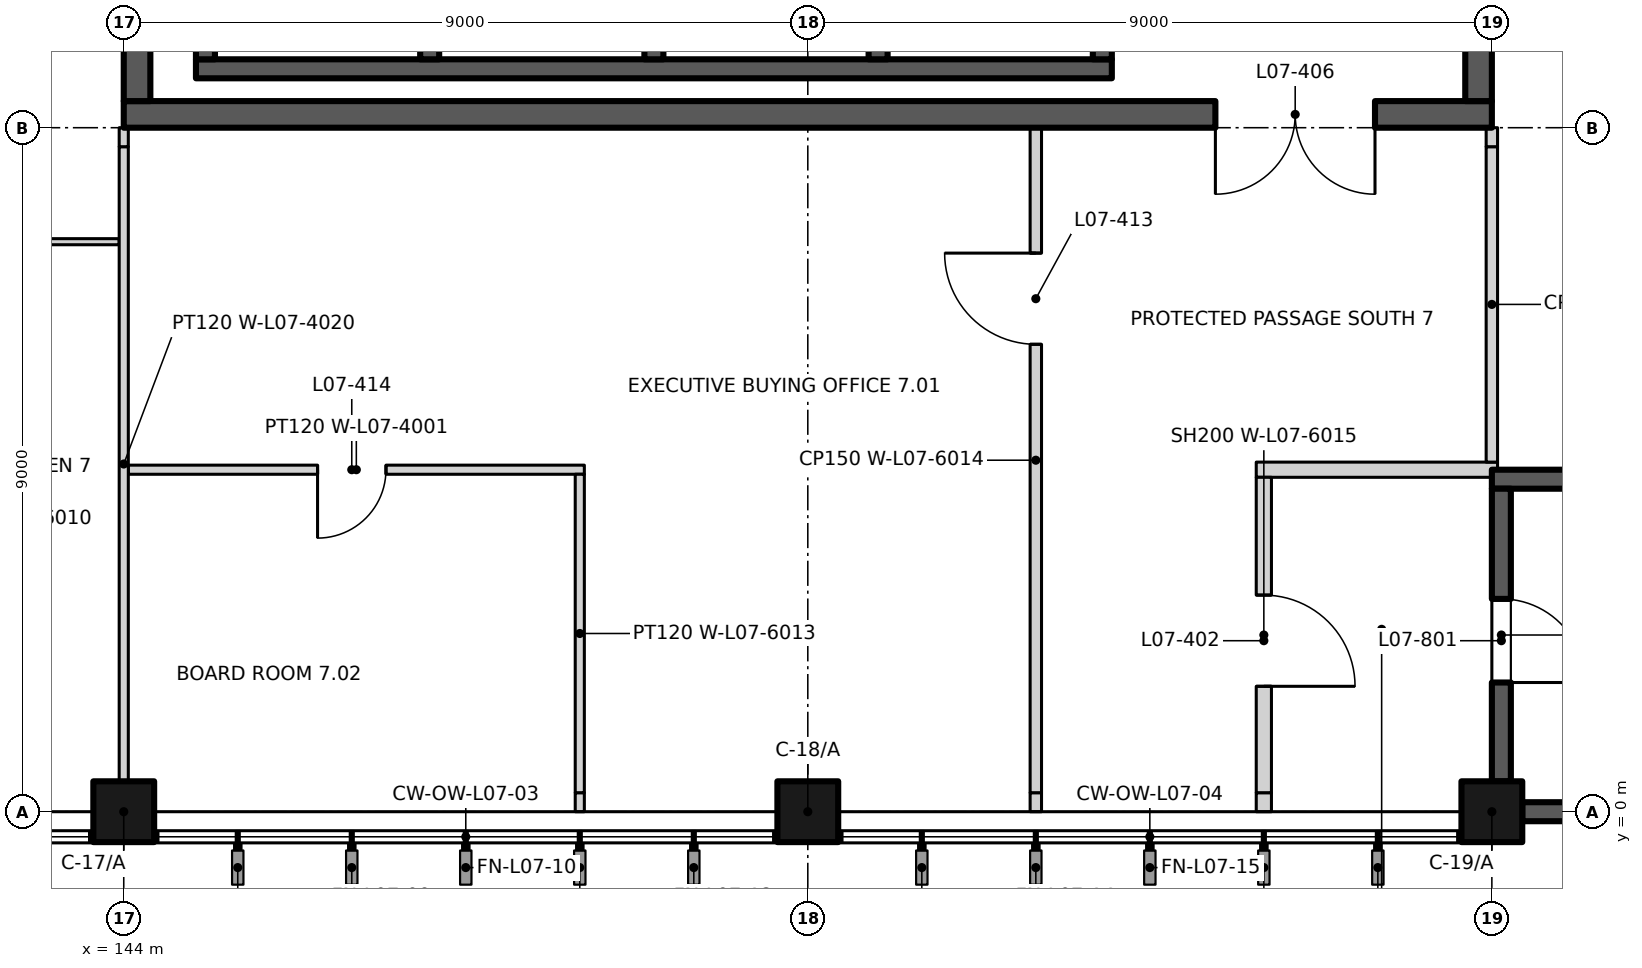
"""IFC4 building model, lengths in metres.
Left out: names, types, materials, properties, quantities, classifications, styles, units other than length and angle.
Written with IfcOpenShell. Run it as: python <this file> out.ifc"""

import sys

from ifc_helpers import new_model, si_unit, direction, frame, frame_2d, origin, origin_2d, place, context, subcontext, project, spatial, rectangle, extrude, element, fill, save


model = new_model("IFC4")
c1 = context("Model", 3, precision=1e-05, world=origin(), true_north=direction((0.0, 1.0)))
c2 = subcontext(c1, "Body", "Model", "MODEL_VIEW")
j1 = project(units=[si_unit("LENGTHUNIT", "METRE"), si_unit("PLANEANGLEUNIT", "RADIAN")], contexts=[c1])
p1 = place(None, origin())
s1 = spatial("IfcSite", under=j1, at=p1, CompositionType="ELEMENT")
p2 = place(p1, origin())
s2 = spatial("IfcBuilding", under=s1, at=p2, CompositionType="ELEMENT")
p3 = place(p2, frame((0.0, 0.0, 33.0)))
s3 = spatial("IfcBuildingStorey", under=s2, at=p3, CompositionType="ELEMENT", Elevation=33.0)
for number, where, z_axis, x_axis in (
    (1, (144.0, 0.0, 0.0), (0.0, 0.0, 1.0), (1.0, 0.0, 0.0)),
    (2, (153.0, 0.0, 0.0), (0.0, 0.0, 1.0), (1.0, 0.0, 0.0)),
    (3, (162.0, 0.0, 0.0), (0.0, 0.0, 1.0), (1.0, 0.0, 0.0)),
):
    element("IfcColumn", number, at=place(p3, frame(where, z_axis=z_axis, x_axis=x_axis)), inside=s3, PredefinedType="COLUMN", context=c2, shape_type="SweptSolid", body=[
        extrude(rectangle(XDim=0.8, YDim=0.8, at=origin_2d()), origin(), (0.0, 0.0, 1.0), 4.5),
    ])
p4 = place(p3, frame((162.4, 0.0, 0.0), z_axis=(0.0, 0.0, 1.0), x_axis=(1.0, 0.0, 0.0)))
e4 = element("IfcWall", 4, at=p4, inside=s3, PredefinedType="SHEAR", context=c2, shape_type="SweptSolid", body=[
    extrude(rectangle(XDim=8.2, YDim=0.25, at=frame_2d((4.1, 0.0))), origin(), (0.0, 0.0, 1.0), 4.5),
])
p5 = place(p3, frame((162.0, 4.375, 0.0), z_axis=(0.0, 0.0, 1.0), x_axis=(1.0, 0.0, 0.0)))
e5 = element("IfcWall", 5, at=p5, inside=s3, PredefinedType="SHEAR", context=c2, shape_type="SweptSolid", body=[
    extrude(rectangle(XDim=9.0, YDim=0.25, at=frame_2d((4.5, 0.0))), origin(), (0.0, 0.0, 1.0), 4.5),
])
p6 = place(p3, frame((162.125, 0.4, 0.0), z_axis=(0.0, 0.0, 1.0), x_axis=(0.0, 1.0, 0.0)))
e6 = element("IfcWall", 6, at=p6, inside=s3, PredefinedType="SHEAR", context=c2, shape_type="SweptSolid", body=[
    extrude(rectangle(XDim=3.85, YDim=0.25, at=frame_2d((1.925, 0.0))), origin(), (0.0, 0.0, 1.0), 4.5),
])
p7 = place(p6, frame((2.4, 0.0, 0.0), z_axis=(0.0, 0.0, 1.0), x_axis=(-1.0, 0.0, 0.0)))
e7 = element("IfcOpeningElement", 7, at=p7, cuts=e6, PredefinedType="OPENING", context=c2, shape_type="SweptSolid", body=[
    extrude(rectangle(XDim=1.1, YDim=2.1, at=frame_2d((0.55, 1.05))), frame((0.0, 0.135, 0.0), z_axis=(0.0, -1.0, 0.0), x_axis=(1.0, 0.0, 0.0)), (0.0, 0.0, 1.0), 0.27),
])
p8 = place(p3, frame((144.95, 9.775, 0.0), z_axis=(0.0, 0.0, 1.0), x_axis=(1.0, 0.0, 0.0)))
e8 = element("IfcWall", 8, at=p8, inside=s3, PredefinedType="SHEAR", context=c2, shape_type="SweptSolid", body=[
    extrude(rectangle(XDim=12.05, YDim=0.25, at=frame_2d((6.025, 0.0))), origin(), (0.0, 0.0, 1.0), 4.5),
])
for number, where, z_axis, x_axis in (
    (9, (145.075, 9.9, 0.0), (0.0, 0.0, 1.0), (0.0, 1.0, 0.0)),
    (10, (148.025, 9.9, 0.0), (0.0, 0.0, 1.0), (0.0, 1.0, 0.0)),
    (11, (150.975, 9.9, 0.0), (0.0, 0.0, 1.0), (0.0, 1.0, 0.0)),
    (12, (153.925, 9.9, 0.0), (0.0, 0.0, 1.0), (0.0, 1.0, 0.0)),
    (13, (156.875, 9.9, 0.0), (0.0, 0.0, 1.0), (0.0, 1.0, 0.0)),
):
    element("IfcWall", number, at=place(p3, frame(where, z_axis=z_axis, x_axis=x_axis)), inside=s3, PredefinedType="SHEAR", context=c2, shape_type="SweptSolid", body=[
        extrude(rectangle(XDim=2.7, YDim=0.25, at=frame_2d((1.35, 0.0))), origin(), (0.0, 0.0, 1.0), 4.5),
    ])
p9 = place(p3, frame((144.06, 4.5, 0.0), z_axis=(0.0, 0.0, 1.0), x_axis=(1.0, 0.0, 0.0)))
e14 = element("IfcWall", 14, at=p9, inside=s3, PredefinedType="PARTITIONING", context=c2, shape_type="SweptSolid", body=[
    extrude(rectangle(XDim=6.0, YDim=0.12, at=frame_2d((3.0, 0.0))), origin(), (0.0, 0.0, 1.0), 4.2),
])
p10 = place(p9, frame((3.39, 0.0, 0.0), z_axis=(0.0, 0.0, 1.0), x_axis=(-1.0, 0.0, 0.0)))
e15 = element("IfcOpeningElement", 15, at=p10, cuts=e14, PredefinedType="OPENING", context=c2, shape_type="SweptSolid", body=[
    extrude(rectangle(XDim=0.9, YDim=2.1, at=frame_2d((0.45, 1.05))), frame((0.0, 0.07, 0.0), z_axis=(0.0, -1.0, 0.0), x_axis=(1.0, 0.0, 0.0)), (0.0, 0.0, 1.0), 0.14),
])
p11 = place(p3, frame((158.9, 4.5, 0.0), z_axis=(0.0, 0.0, 1.0), x_axis=(1.0, 0.0, 0.0)))
e16 = element("IfcWall", 16, at=p11, inside=s3, PredefinedType="PARTITIONING", context=c2, shape_type="SweptSolid", body=[
    extrude(rectangle(XDim=3.175, YDim=0.2, at=frame_2d((1.587, 0.0))), origin(), (0.0, 0.0, 1.0), 4.2),
])
p12 = place(p3, frame((135.06, 7.5, 0.0), z_axis=(0.0, 0.0, 1.0), x_axis=(1.0, 0.0, 0.0)))
e17 = element("IfcWall", 17, at=p12, inside=s3, PredefinedType="PARTITIONING", context=c2, shape_type="SweptSolid", body=[
    extrude(rectangle(XDim=8.88, YDim=0.08, at=frame_2d((4.44, 0.0))), origin(), (0.0, 0.0, 1.0), 4.2),
])
p13 = place(p12, frame((4.64, 0.0, 0.0), z_axis=(0.0, 0.0, 1.0), x_axis=(-1.0, 0.0, 0.0)))
e18 = element("IfcOpeningElement", 18, at=p13, cuts=e17, PredefinedType="OPENING", context=c2, shape_type="SweptSolid", body=[
    extrude(rectangle(XDim=0.9, YDim=2.1, at=frame_2d((0.45, 1.05))), frame((0.0, 0.05, 0.0), z_axis=(0.0, -1.0, 0.0), x_axis=(1.0, 0.0, 0.0)), (0.0, 0.0, 1.0), 0.1),
])
p14 = place(p12, frame((7.89, 0.0, 0.0), z_axis=(0.0, 0.0, 1.0), x_axis=(-1.0, 0.0, 0.0)))
e19 = element("IfcOpeningElement", 19, at=p14, cuts=e17, PredefinedType="OPENING", context=c2, shape_type="SweptSolid", body=[
    extrude(rectangle(XDim=0.9, YDim=2.1, at=frame_2d((0.45, 1.05))), frame((0.0, 0.05, 0.0), z_axis=(0.0, -1.0, 0.0), x_axis=(1.0, 0.0, 0.0)), (0.0, 0.0, 1.0), 0.1),
])
p15 = place(p3, frame((144.0, 9.175, 0.0), z_axis=(0.0, 0.0, 1.0), x_axis=(1.0, 0.0, 0.0)))
e20 = element("IfcWall", 20, at=p15, inside=s3, PredefinedType="SHEAR", context=c2, shape_type="SweptSolid", body=[
    extrude(rectangle(XDim=18.0, YDim=0.35, at=frame_2d((9.0, 0.0))), origin(), (0.0, 0.0, 1.0), 4.2),
])
p16 = place(p15, frame((16.463, 0.0, 0.0), z_axis=(0.0, 0.0, 1.0), x_axis=(-1.0, 0.0, 0.0)))
e21 = element("IfcOpeningElement", 21, at=p16, cuts=e20, PredefinedType="OPENING", context=c2, shape_type="SweptSolid", body=[
    extrude(rectangle(XDim=2.1, YDim=2.4, at=frame_2d((1.05, 1.2))), frame((0.0, 0.185, 0.0), z_axis=(0.0, -1.0, 0.0), x_axis=(1.0, 0.0, 0.0)), (0.0, 0.0, 1.0), 0.37),
])
p17 = place(p3, frame((144.0, 0.4, 0.0), z_axis=(0.0, 0.0, 1.0), x_axis=(0.0, 1.0, 0.0)))
e22 = element("IfcWall", 22, at=p17, inside=s3, PredefinedType="PARTITIONING", context=c2, shape_type="SweptSolid", body=[
    extrude(rectangle(XDim=8.35, YDim=0.12, at=frame_2d((4.175, 0.0))), origin(), (0.0, 0.0, 1.0), 4.2),
])
p18 = place(p3, frame((144.0, 8.75, 0.0), z_axis=(0.0, 0.0, 1.0), x_axis=(0.0, 1.0, 0.0)))
e23 = element("IfcWall", 23, at=p18, inside=s3, PredefinedType="PARTITIONING", context=c2, shape_type="SweptSolid", body=[
    extrude(rectangle(XDim=0.25, YDim=0.12, at=frame_2d((0.125, 0.0))), origin(), (0.0, 0.0, 1.0), 3.6),
])
p19 = place(p3, frame((144.175, 9.35, 0.0), z_axis=(0.0, 0.0, 1.0), x_axis=(0.0, 1.0, 0.0)))
e24 = element("IfcWall", 24, at=p19, inside=s3, PredefinedType="SHEAR", context=c2, shape_type="SweptSolid", body=[
    extrude(rectangle(XDim=17.4, YDim=0.35, at=frame_2d((8.7, 0.0))), origin(), (0.0, 0.0, 1.0), 4.2),
])
p20 = place(p19, frame((3.75, 0.0, 0.0)))
e25 = element("IfcOpeningElement", 25, at=p20, cuts=e24, PredefinedType="OPENING", context=c2, shape_type="SweptSolid", body=[
    extrude(rectangle(XDim=1.6, YDim=2.4, at=frame_2d((0.8, 1.2))), frame((0.0, 0.185, 0.0), z_axis=(0.0, -1.0, 0.0), x_axis=(1.0, 0.0, 0.0)), (0.0, 0.0, 1.0), 0.37),
])
p21 = place(p3, frame((150.0, 0.0, 0.0), z_axis=(0.0, 0.0, 1.0), x_axis=(0.0, 1.0, 0.0)))
e26 = element("IfcWall", 26, at=p21, inside=s3, PredefinedType="PARTITIONING", context=c2, shape_type="SweptSolid", body=[
    extrude(rectangle(XDim=0.25, YDim=0.12, at=frame_2d((0.125, 0.0))), origin(), (0.0, 0.0, 1.0), 3.6),
])
p22 = place(p3, frame((150.0, 0.25, 0.0), z_axis=(0.0, 0.0, 1.0), x_axis=(0.0, 1.0, 0.0)))
e27 = element("IfcWall", 27, at=p22, inside=s3, PredefinedType="PARTITIONING", context=c2, shape_type="SweptSolid", body=[
    extrude(rectangle(XDim=4.19, YDim=0.12, at=frame_2d((2.095, 0.0))), origin(), (0.0, 0.0, 1.0), 4.2),
])
p23 = place(p3, frame((156.0, 0.0, 0.0), z_axis=(0.0, 0.0, 1.0), x_axis=(0.0, 1.0, 0.0)))
e28 = element("IfcWall", 28, at=p23, inside=s3, PredefinedType="PARTITIONING", context=c2, shape_type="SweptSolid", body=[
    extrude(rectangle(XDim=0.25, YDim=0.15, at=frame_2d((0.125, 0.0))), origin(), (0.0, 0.0, 1.0), 3.6),
])
p24 = place(p3, frame((156.0, 0.25, 0.0), z_axis=(0.0, 0.0, 1.0), x_axis=(0.0, 1.0, 0.0)))
e29 = element("IfcWall", 29, at=p24, inside=s3, PredefinedType="PARTITIONING", context=c2, shape_type="SweptSolid", body=[
    extrude(rectangle(XDim=8.75, YDim=0.15, at=frame_2d((4.375, 0.0))), origin(), (0.0, 0.0, 1.0), 4.2),
])
p25 = place(p24, frame((5.9, 0.0, 0.0)))
e30 = element("IfcOpeningElement", 30, at=p25, cuts=e29, PredefinedType="OPENING", context=c2, shape_type="SweptSolid", body=[
    extrude(rectangle(XDim=1.2, YDim=2.1, at=frame_2d((0.6, 1.05))), frame((0.0, 0.085, 0.0), z_axis=(0.0, -1.0, 0.0), x_axis=(1.0, 0.0, 0.0)), (0.0, 0.0, 1.0), 0.17),
])
p26 = place(p3, frame((159.0, 0.0, 0.0), z_axis=(0.0, 0.0, 1.0), x_axis=(0.0, 1.0, 0.0)))
e31 = element("IfcWall", 31, at=p26, inside=s3, PredefinedType="PARTITIONING", context=c2, shape_type="SweptSolid", body=[
    extrude(rectangle(XDim=0.25, YDim=0.2, at=frame_2d((0.125, 0.0))), origin(), (0.0, 0.0, 1.0), 3.6),
])
p27 = place(p3, frame((159.0, 0.25, 0.0), z_axis=(0.0, 0.0, 1.0), x_axis=(0.0, 1.0, 0.0)))
e32 = element("IfcWall", 32, at=p27, inside=s3, PredefinedType="PARTITIONING", context=c2, shape_type="SweptSolid", body=[
    extrude(rectangle(XDim=4.15, YDim=0.2, at=frame_2d((2.075, 0.0))), origin(), (0.0, 0.0, 1.0), 4.2),
])
p28 = place(p27, frame((2.6, 0.0, 0.0), z_axis=(0.0, 0.0, 1.0), x_axis=(-1.0, 0.0, 0.0)))
e33 = element("IfcOpeningElement", 33, at=p28, cuts=e32, PredefinedType="OPENING", context=c2, shape_type="SweptSolid", body=[
    extrude(rectangle(XDim=1.2, YDim=2.1, at=frame_2d((0.6, 1.05))), frame((0.0, 0.11, 0.0), z_axis=(0.0, -1.0, 0.0), x_axis=(1.0, 0.0, 0.0)), (0.0, 0.0, 1.0), 0.22),
])
p29 = place(p3, frame((161.825, 9.35, 0.0), z_axis=(0.0, 0.0, 1.0), x_axis=(0.0, 1.0, 0.0)))
e34 = element("IfcWall", 34, at=p29, inside=s3, PredefinedType="SHEAR", context=c2, shape_type="SweptSolid", body=[
    extrude(rectangle(XDim=17.4, YDim=0.35, at=frame_2d((8.7, 0.0))), origin(), (0.0, 0.0, 1.0), 4.2),
])
p30 = place(p29, frame((7.3, 0.0, 0.0), z_axis=(0.0, 0.0, 1.0), x_axis=(-1.0, 0.0, 0.0)))
e35 = element("IfcOpeningElement", 35, at=p30, cuts=e34, PredefinedType="OPENING", context=c2, shape_type="SweptSolid", body=[
    extrude(rectangle(XDim=1.8, YDim=2.4, at=frame_2d((0.9, 1.2))), frame((0.0, 0.185, 0.0), z_axis=(0.0, -1.0, 0.0), x_axis=(1.0, 0.0, 0.0)), (0.0, 0.0, 1.0), 0.37),
])
p31 = place(p3, frame((162.0, 4.6, 0.0), z_axis=(0.0, 0.0, 1.0), x_axis=(0.0, 1.0, 0.0)))
e36 = element("IfcWall", 36, at=p31, inside=s3, PredefinedType="PARTITIONING", context=c2, shape_type="SweptSolid", body=[
    extrude(rectangle(XDim=4.15, YDim=0.15, at=frame_2d((2.075, 0.0))), origin(), (0.0, 0.0, 1.0), 4.2),
])
p32 = place(p3, frame((162.0, 8.75, 0.0), z_axis=(0.0, 0.0, 1.0), x_axis=(0.0, 1.0, 0.0)))
e37 = element("IfcWall", 37, at=p32, inside=s3, PredefinedType="PARTITIONING", context=c2, shape_type="SweptSolid", body=[
    extrude(rectangle(XDim=0.25, YDim=0.15, at=frame_2d((0.125, 0.0))), origin(), (0.0, 0.0, 1.0), 3.6),
])
p33 = place(p7, origin())
e38 = element("IfcDoor", 38, at=p33, inside=s3, OperationType="SINGLE_SWING_RIGHT", PredefinedType="DOOR", context=c2, shape_type="SweptSolid", body=[
    extrude(rectangle(XDim=1.1, YDim=2.1, at=frame_2d((0.55, 1.05))), frame((0.0, 0.025, 0.0), z_axis=(0.0, -1.0, 0.0), x_axis=(1.0, 0.0, 0.0)), (0.0, 0.0, 1.0), 0.05),
])
fill(e7, e38)
p34 = place(p28, origin())
e39 = element("IfcDoor", 39, at=p34, inside=s3, OperationType="SINGLE_SWING_RIGHT", PredefinedType="DOOR", context=c2, shape_type="SweptSolid", body=[
    extrude(rectangle(XDim=1.2, YDim=2.1, at=frame_2d((0.6, 1.05))), frame((0.0, 0.025, 0.0), z_axis=(0.0, -1.0, 0.0), x_axis=(1.0, 0.0, 0.0)), (0.0, 0.0, 1.0), 0.05),
])
fill(e33, e39)
p35 = place(p16, origin())
e40 = element("IfcDoor", 40, at=p35, inside=s3, OperationType="DOUBLE_DOOR_SINGLE_SWING", PredefinedType="DOOR", context=c2, shape_type="SweptSolid", body=[
    extrude(rectangle(XDim=2.1, YDim=2.4, at=frame_2d((1.05, 1.2))), frame((0.0, 0.025, 0.0), z_axis=(0.0, -1.0, 0.0), x_axis=(1.0, 0.0, 0.0)), (0.0, 0.0, 1.0), 0.05),
])
fill(e21, e40)
p36 = place(p25, origin())
e41 = element("IfcDoor", 41, at=p36, inside=s3, OperationType="SINGLE_SWING_RIGHT", PredefinedType="DOOR", context=c2, shape_type="SweptSolid", body=[
    extrude(rectangle(XDim=1.2, YDim=2.1, at=frame_2d((0.6, 1.05))), frame((0.0, 0.025, 0.0), z_axis=(0.0, -1.0, 0.0), x_axis=(1.0, 0.0, 0.0)), (0.0, 0.0, 1.0), 0.05),
])
fill(e30, e41)
p37 = place(p10, origin())
e42 = element("IfcDoor", 42, at=p37, inside=s3, OperationType="SINGLE_SWING_RIGHT", PredefinedType="DOOR", context=c2, shape_type="SweptSolid", body=[
    extrude(rectangle(XDim=0.9, YDim=2.1, at=frame_2d((0.45, 1.05))), frame((0.0, 0.025, 0.0), z_axis=(0.0, -1.0, 0.0), x_axis=(1.0, 0.0, 0.0)), (0.0, 0.0, 1.0), 0.05),
])
fill(e15, e42)
save(model, sys.argv[1])
